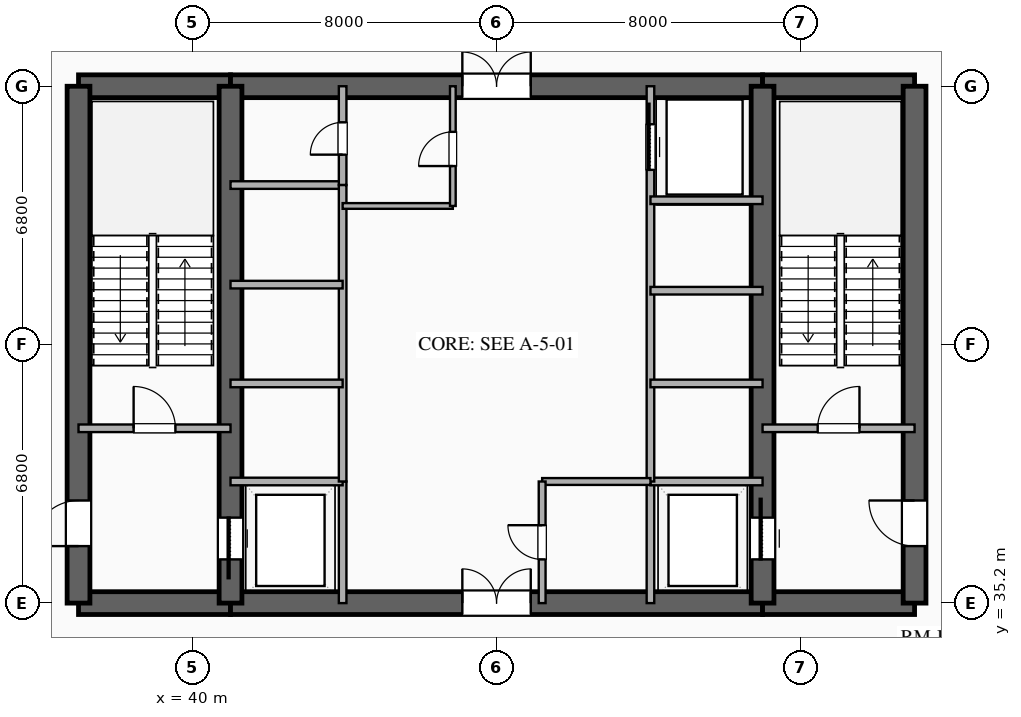
"""IFC4 building model, lengths in metres.
Left out: names, types, materials, properties, quantities, classifications, styles, units other than length and angle.
Written with IfcOpenShell. Run it as: python <this file> out.ifc"""

import sys

from ifc_helpers import new_model, si_unit, direction, frame, frame_2d, origin, place, context, subcontext, project, spatial, rectangle, extrude, element, fill, save


model = new_model("IFC4")
c1 = context("Model", 3, precision=1e-05, world=origin(), true_north=direction((0.0, 1.0)))
c2 = subcontext(c1, "Body", "Model", "MODEL_VIEW")
j1 = project(units=[si_unit("LENGTHUNIT", "METRE"), si_unit("PLANEANGLEUNIT", "RADIAN")], contexts=[c1])
p1 = place(None, origin())
s1 = spatial("IfcSite", under=j1, at=p1, CompositionType="ELEMENT")
p2 = place(p1, origin())
s2 = spatial("IfcBuilding", under=s1, at=p2, CompositionType="ELEMENT")
p3 = place(p2, frame((0.0, 0.0, -9.0)))
s3 = spatial("IfcBuildingStorey", under=s2, at=p3, CompositionType="ELEMENT", Elevation=-9.0)
p4 = place(p3, frame((37.0, 35.2, 0.0), z_axis=(0.0, 0.0, 1.0), x_axis=(1.0, 0.0, 0.0)))
e1 = element("IfcWall", 1, at=p4, inside=s3, PredefinedType="SHEAR", context=c2, shape_type="SweptSolid", body=[
    extrude(rectangle(XDim=4.0, YDim=0.6, at=frame_2d((2.0, 0.0))), origin(), (0.0, 0.0, 1.0), 4.18),
])
p5 = place(p3, frame((41.0, 35.2, 0.0), z_axis=(0.0, 0.0, 1.0), x_axis=(1.0, 0.0, 0.0)))
e2 = element("IfcWall", 2, at=p5, inside=s3, PredefinedType="SHEAR", context=c2, shape_type="SweptSolid", body=[
    extrude(rectangle(XDim=14.0, YDim=0.6, at=frame_2d((7.0, 0.0))), origin(), (0.0, 0.0, 1.0), 4.18),
])
p6 = place(p5, frame((6.1, 0.0, 0.0)))
e3 = element("IfcOpeningElement", 3, at=p6, cuts=e2, PredefinedType="OPENING", context=c2, shape_type="SweptSolid", body=[
    extrude(rectangle(XDim=1.8, YDim=2.25, at=frame_2d((0.9, 1.125))), frame((0.0, 0.31, 0.0), z_axis=(0.0, -1.0, 0.0), x_axis=(1.0, 0.0, 0.0)), (0.0, 0.0, 1.0), 0.62),
])
for number, where, z_axis, x_axis in (
    (4, (55.0, 35.2, 0.0), (0.0, 0.0, 1.0), (1.0, 0.0, 0.0)),
    (5, (37.0, 48.8, 0.0), (0.0, 0.0, 1.0), (1.0, 0.0, 0.0)),
):
    element("IfcWall", number, at=place(p3, frame(where, z_axis=z_axis, x_axis=x_axis)), inside=s3, PredefinedType="SHEAR", context=c2, shape_type="SweptSolid", body=[
        extrude(rectangle(XDim=4.0, YDim=0.6, at=frame_2d((2.0, 0.0))), origin(), (0.0, 0.0, 1.0), 4.18),
    ])
p7 = place(p3, frame((41.0, 48.8, 0.0), z_axis=(0.0, 0.0, 1.0), x_axis=(1.0, 0.0, 0.0)))
e6 = element("IfcWall", 6, at=p7, inside=s3, PredefinedType="SHEAR", context=c2, shape_type="SweptSolid", body=[
    extrude(rectangle(XDim=14.0, YDim=0.6, at=frame_2d((7.0, 0.0))), origin(), (0.0, 0.0, 1.0), 4.18),
])
p8 = place(p7, frame((6.1, 0.0, 0.0)))
e7 = element("IfcOpeningElement", 7, at=p8, cuts=e6, PredefinedType="OPENING", context=c2, shape_type="SweptSolid", body=[
    extrude(rectangle(XDim=1.8, YDim=2.25, at=frame_2d((0.9, 1.125))), frame((0.0, 0.31, 0.0), z_axis=(0.0, -1.0, 0.0), x_axis=(1.0, 0.0, 0.0)), (0.0, 0.0, 1.0), 0.62),
])
p9 = place(p3, frame((55.0, 48.8, 0.0), z_axis=(0.0, 0.0, 1.0), x_axis=(1.0, 0.0, 0.0)))
e8 = element("IfcWall", 8, at=p9, inside=s3, PredefinedType="SHEAR", context=c2, shape_type="SweptSolid", body=[
    extrude(rectangle(XDim=4.0, YDim=0.6, at=frame_2d((2.0, 0.0))), origin(), (0.0, 0.0, 1.0), 4.18),
])
p10 = place(p3, frame((37.0, 35.2, 0.0), z_axis=(0.0, 0.0, 1.0), x_axis=(0.0, 1.0, 0.0)))
e9 = element("IfcWall", 9, at=p10, inside=s3, PredefinedType="SHEAR", context=c2, shape_type="SweptSolid", body=[
    extrude(rectangle(XDim=13.6, YDim=0.6, at=frame_2d((6.8, 0.0))), origin(), (0.0, 0.0, 1.0), 4.18),
])
p11 = place(p10, frame((1.5, 0.0, 0.0)))
e10 = element("IfcOpeningElement", 10, at=p11, cuts=e9, PredefinedType="OPENING", context=c2, shape_type="SweptSolid", body=[
    extrude(rectangle(XDim=1.2, YDim=2.15, at=frame_2d((0.6, 1.075))), frame((0.0, 0.31, 0.0), z_axis=(0.0, -1.0, 0.0), x_axis=(1.0, 0.0, 0.0)), (0.0, 0.0, 1.0), 0.62),
])
p12 = place(p3, frame((59.0, 35.2, 0.0), z_axis=(0.0, 0.0, 1.0), x_axis=(0.0, 1.0, 0.0)))
e11 = element("IfcWall", 11, at=p12, inside=s3, PredefinedType="SHEAR", context=c2, shape_type="SweptSolid", body=[
    extrude(rectangle(XDim=13.6, YDim=0.6, at=frame_2d((6.8, 0.0))), origin(), (0.0, 0.0, 1.0), 4.18),
])
p13 = place(p12, frame((1.5, 0.0, 0.0)))
e12 = element("IfcOpeningElement", 12, at=p13, cuts=e11, PredefinedType="OPENING", context=c2, shape_type="SweptSolid", body=[
    extrude(rectangle(XDim=1.2, YDim=2.15, at=frame_2d((0.6, 1.075))), frame((0.0, 0.31, 0.0), z_axis=(0.0, -1.0, 0.0), x_axis=(1.0, 0.0, 0.0)), (0.0, 0.0, 1.0), 0.62),
])
p14 = place(p3, frame((41.0, 35.2, 0.0), z_axis=(0.0, 0.0, 1.0), x_axis=(0.0, 1.0, 0.0)))
e13 = element("IfcWall", 13, at=p14, inside=s3, PredefinedType="SHEAR", context=c2, shape_type="SweptSolid", body=[
    extrude(rectangle(XDim=13.6, YDim=0.6, at=frame_2d((6.8, 0.0))), origin(), (0.0, 0.0, 1.0), 4.18),
])
p15 = place(p14, frame((1.15, 0.0, 0.0)))
e14 = element("IfcOpeningElement", 14, at=p15, cuts=e13, PredefinedType="OPENING", context=c2, shape_type="SweptSolid", body=[
    extrude(rectangle(XDim=1.1, YDim=2.2, at=frame_2d((0.55, 1.1))), frame((0.0, 0.31, 0.0), z_axis=(0.0, -1.0, 0.0), x_axis=(1.0, 0.0, 0.0)), (0.0, 0.0, 1.0), 0.62),
])
p16 = place(p3, frame((55.0, 35.2, 0.0), z_axis=(0.0, 0.0, 1.0), x_axis=(0.0, 1.0, 0.0)))
e15 = element("IfcWall", 15, at=p16, inside=s3, PredefinedType="SHEAR", context=c2, shape_type="SweptSolid", body=[
    extrude(rectangle(XDim=13.6, YDim=0.6, at=frame_2d((6.8, 0.0))), origin(), (0.0, 0.0, 1.0), 4.18),
])
p17 = place(p16, frame((1.15, 0.0, 0.0)))
e16 = element("IfcOpeningElement", 16, at=p17, cuts=e15, PredefinedType="OPENING", context=c2, shape_type="SweptSolid", body=[
    extrude(rectangle(XDim=1.1, YDim=2.2, at=frame_2d((0.55, 1.1))), frame((0.0, 0.31, 0.0), z_axis=(0.0, -1.0, 0.0), x_axis=(1.0, 0.0, 0.0)), (0.0, 0.0, 1.0), 0.62),
])
p18 = place(p3, frame((37.0, 39.8, 0.0), z_axis=(0.0, 0.0, 1.0), x_axis=(1.0, 0.0, 0.0)))
e17 = element("IfcWall", 17, at=p18, inside=s3, PredefinedType="SOLIDWALL", context=c2, shape_type="SweptSolid", body=[
    extrude(rectangle(XDim=4.0, YDim=0.2, at=frame_2d((2.0, 0.0))), origin(), (0.0, 0.0, 1.0), 3.38),
])
p19 = place(p18, frame((1.45, 0.0, 0.0)))
e18 = element("IfcOpeningElement", 18, at=p19, cuts=e17, PredefinedType="OPENING", context=c2, shape_type="SweptSolid", body=[
    extrude(rectangle(XDim=1.1, YDim=2.15, at=frame_2d((0.55, 1.075))), frame((0.0, 0.11, 0.0), z_axis=(0.0, -1.0, 0.0), x_axis=(1.0, 0.0, 0.0)), (0.0, 0.0, 1.0), 0.22),
])
p20 = place(p3, frame((55.0, 39.8, 0.0), z_axis=(0.0, 0.0, 1.0), x_axis=(1.0, 0.0, 0.0)))
e19 = element("IfcWall", 19, at=p20, inside=s3, PredefinedType="SOLIDWALL", context=c2, shape_type="SweptSolid", body=[
    extrude(rectangle(XDim=4.0, YDim=0.2, at=frame_2d((2.0, 0.0))), origin(), (0.0, 0.0, 1.0), 3.38),
])
p21 = place(p20, frame((1.45, 0.0, 0.0)))
e20 = element("IfcOpeningElement", 20, at=p21, cuts=e19, PredefinedType="OPENING", context=c2, shape_type="SweptSolid", body=[
    extrude(rectangle(XDim=1.1, YDim=2.15, at=frame_2d((0.55, 1.075))), frame((0.0, 0.11, 0.0), z_axis=(0.0, -1.0, 0.0), x_axis=(1.0, 0.0, 0.0)), (0.0, 0.0, 1.0), 0.22),
])
p22 = place(p3, frame((43.95, 35.2, 0.0), z_axis=(0.0, 0.0, 1.0), x_axis=(0.0, 1.0, 0.0)))
e21 = element("IfcWall", 21, at=p22, inside=s3, PredefinedType="SOLIDWALL", context=c2, shape_type="SweptSolid", body=[
    extrude(rectangle(XDim=3.2, YDim=0.2, at=frame_2d((1.6, 0.0))), origin(), (0.0, 0.0, 1.0), 3.38),
])
p23 = place(p3, frame((41.0, 38.4, 0.0), z_axis=(0.0, 0.0, 1.0), x_axis=(1.0, 0.0, 0.0)))
e22 = element("IfcWall", 22, at=p23, inside=s3, PredefinedType="SOLIDWALL", context=c2, shape_type="SweptSolid", body=[
    extrude(rectangle(XDim=2.95, YDim=0.2, at=frame_2d((1.475, 0.0))), origin(), (0.0, 0.0, 1.0), 3.38),
])
p24 = place(p3, frame((52.05, 35.2, 0.0), z_axis=(0.0, 0.0, 1.0), x_axis=(0.0, 1.0, 0.0)))
e23 = element("IfcWall", 23, at=p24, inside=s3, PredefinedType="SOLIDWALL", context=c2, shape_type="SweptSolid", body=[
    extrude(rectangle(XDim=3.2, YDim=0.2, at=frame_2d((1.6, 0.0))), origin(), (0.0, 0.0, 1.0), 3.38),
])
for number, where, z_axis, x_axis in (
    (24, (52.05, 38.4, 0.0), (0.0, 0.0, 1.0), (1.0, 0.0, 0.0)),
    (25, (41.0, 46.2, 0.0), (0.0, 0.0, 1.0), (1.0, 0.0, 0.0)),
):
    element("IfcWall", number, at=place(p3, frame(where, z_axis=z_axis, x_axis=x_axis)), inside=s3, PredefinedType="SOLIDWALL", context=c2, shape_type="SweptSolid", body=[
        extrude(rectangle(XDim=2.95, YDim=0.2, at=frame_2d((1.475, 0.0))), origin(), (0.0, 0.0, 1.0), 3.38),
    ])
p25 = place(p3, frame((43.95, 46.2, 0.0), z_axis=(0.0, 0.0, 1.0), x_axis=(0.0, 1.0, 0.0)))
e26 = element("IfcWall", 26, at=p25, inside=s3, PredefinedType="SOLIDWALL", context=c2, shape_type="SweptSolid", body=[
    extrude(rectangle(XDim=2.6, YDim=0.2, at=frame_2d((1.3, 0.0))), origin(), (0.0, 0.0, 1.0), 3.38),
])
p26 = place(p25, frame((0.8, 0.0, 0.0)))
e27 = element("IfcOpeningElement", 27, at=p26, cuts=e26, PredefinedType="OPENING", context=c2, shape_type="SweptSolid", body=[
    extrude(rectangle(XDim=0.85, YDim=2.15, at=frame_2d((0.425, 1.075))), frame((0.0, 0.11, 0.0), z_axis=(0.0, -1.0, 0.0), x_axis=(1.0, 0.0, 0.0)), (0.0, 0.0, 1.0), 0.22),
])
p27 = place(p3, frame((43.95, 38.4, 0.0), z_axis=(0.0, 0.0, 1.0), x_axis=(0.0, 1.0, 0.0)))
e28 = element("IfcWall", 28, at=p27, inside=s3, PredefinedType="SOLIDWALL", context=c2, shape_type="SweptSolid", body=[
    extrude(rectangle(XDim=7.8, YDim=0.2, at=frame_2d((3.9, 0.0))), origin(), (0.0, 0.0, 1.0), 3.38),
])
for number, where, z_axis, x_axis in (
    (29, (41.0, 40.98, 0.0), (0.0, 0.0, 1.0), (1.0, 0.0, 0.0)),
    (30, (41.0, 43.58, 0.0), (0.0, 0.0, 1.0), (1.0, 0.0, 0.0)),
):
    element("IfcWall", number, at=place(p3, frame(where, z_axis=z_axis, x_axis=x_axis)), inside=s3, PredefinedType="SOLIDWALL", context=c2, shape_type="SweptSolid", body=[
        extrude(rectangle(XDim=2.95, YDim=0.2, at=frame_2d((1.475, 0.0))), origin(), (0.0, 0.0, 1.0), 3.38),
    ])
p28 = place(p3, frame((52.05, 38.4, 0.0), z_axis=(0.0, 0.0, 1.0), x_axis=(0.0, 1.0, 0.0)))
e31 = element("IfcWall", 31, at=p28, inside=s3, PredefinedType="SOLIDWALL", context=c2, shape_type="SweptSolid", body=[
    extrude(rectangle(XDim=10.4, YDim=0.2, at=frame_2d((5.2, 0.0))), origin(), (0.0, 0.0, 1.0), 3.38),
])
p29 = place(p28, frame((8.2, 0.0, 0.0)))
e32 = element("IfcOpeningElement", 32, at=p29, cuts=e31, PredefinedType="OPENING", context=c2, shape_type="SweptSolid", body=[
    extrude(rectangle(XDim=1.2, YDim=2.2, at=frame_2d((0.6, 1.1))), frame((0.0, 0.11, 0.0), z_axis=(0.0, -1.0, 0.0), x_axis=(1.0, 0.0, 0.0)), (0.0, 0.0, 1.0), 0.22),
])
for number, where, z_axis, x_axis in (
    (33, (52.05, 40.98, 0.0), (0.0, 0.0, 1.0), (1.0, 0.0, 0.0)),
    (34, (52.05, 43.42, 0.0), (0.0, 0.0, 1.0), (1.0, 0.0, 0.0)),
    (35, (52.05, 45.8, 0.0), (0.0, 0.0, 1.0), (1.0, 0.0, 0.0)),
):
    element("IfcWall", number, at=place(p3, frame(where, z_axis=z_axis, x_axis=x_axis)), inside=s3, PredefinedType="SOLIDWALL", context=c2, shape_type="SweptSolid", body=[
        extrude(rectangle(XDim=2.95, YDim=0.2, at=frame_2d((1.475, 0.0))), origin(), (0.0, 0.0, 1.0), 3.38),
    ])
p30 = place(p3, frame((43.95, 45.65, 0.0), z_axis=(0.0, 0.0, 1.0), x_axis=(1.0, 0.0, 0.0)))
e36 = element("IfcWall", 36, at=p30, inside=s3, PredefinedType="PARTITIONING", context=c2, shape_type="SweptSolid", body=[
    extrude(rectangle(XDim=2.9, YDim=0.15, at=frame_2d((1.45, 0.0))), origin(), (0.0, 0.0, 1.0), 3.38),
])
p31 = place(p3, frame((46.85, 45.65, 0.0), z_axis=(0.0, 0.0, 1.0), x_axis=(0.0, 1.0, 0.0)))
e37 = element("IfcWall", 37, at=p31, inside=s3, PredefinedType="PARTITIONING", context=c2, shape_type="SweptSolid", body=[
    extrude(rectangle(XDim=3.15, YDim=0.15, at=frame_2d((1.575, 0.0))), origin(), (0.0, 0.0, 1.0), 3.38),
])
p32 = place(p31, frame((1.05, 0.0, 0.0)))
e38 = element("IfcOpeningElement", 38, at=p32, cuts=e37, PredefinedType="OPENING", context=c2, shape_type="SweptSolid", body=[
    extrude(rectangle(XDim=0.9, YDim=2.15, at=frame_2d((0.45, 1.075))), frame((0.0, 0.085, 0.0), z_axis=(0.0, -1.0, 0.0), x_axis=(1.0, 0.0, 0.0)), (0.0, 0.0, 1.0), 0.17),
])
p33 = place(p3, frame((49.2, 38.4, 0.0), z_axis=(0.0, 0.0, 1.0), x_axis=(1.0, 0.0, 0.0)))
e39 = element("IfcWall", 39, at=p33, inside=s3, PredefinedType="PLUMBINGWALL", context=c2, shape_type="SweptSolid", body=[
    extrude(rectangle(XDim=2.85, YDim=0.18, at=frame_2d((1.425, 0.0))), origin(), (0.0, 0.0, 1.0), 3.38),
])
p34 = place(p3, frame((49.2, 35.2, 0.0), z_axis=(0.0, 0.0, 1.0), x_axis=(0.0, 1.0, 0.0)))
e40 = element("IfcWall", 40, at=p34, inside=s3, PredefinedType="PLUMBINGWALL", context=c2, shape_type="SweptSolid", body=[
    extrude(rectangle(XDim=3.2, YDim=0.18, at=frame_2d((1.6, 0.0))), origin(), (0.0, 0.0, 1.0), 3.38),
])
p35 = place(p34, frame((1.15, 0.0, 0.0)))
e41 = element("IfcOpeningElement", 41, at=p35, cuts=e40, PredefinedType="OPENING", context=c2, shape_type="SweptSolid", body=[
    extrude(rectangle(XDim=0.9, YDim=2.1, at=frame_2d((0.45, 1.05))), frame((0.0, 0.1, 0.0), z_axis=(0.0, -1.0, 0.0), x_axis=(1.0, 0.0, 0.0)), (0.0, 0.0, 1.0), 0.2),
])
p36 = place(p15, origin())
e42 = element("IfcDoor", 42, at=p36, inside=s3, OperationType="SLIDING_TO_LEFT", PredefinedType="DOOR", context=c2, shape_type="SweptSolid", body=[
    extrude(rectangle(XDim=1.1, YDim=2.2, at=frame_2d((0.55, 1.1))), frame((0.0, 0.025, 0.0), z_axis=(0.0, -1.0, 0.0), x_axis=(1.0, 0.0, 0.0)), (0.0, 0.0, 1.0), 0.05),
])
fill(e14, e42)
p37 = place(p17, origin())
e43 = element("IfcDoor", 43, at=p37, inside=s3, OperationType="SLIDING_TO_RIGHT", PredefinedType="DOOR", context=c2, shape_type="SweptSolid", body=[
    extrude(rectangle(XDim=1.1, YDim=2.2, at=frame_2d((0.55, 1.1))), frame((0.0, 0.025, 0.0), z_axis=(0.0, -1.0, 0.0), x_axis=(1.0, 0.0, 0.0)), (0.0, 0.0, 1.0), 0.05),
])
fill(e16, e43)
p38 = place(p11, origin())
e44 = element("IfcDoor", 44, at=p38, inside=s3, OperationType="SINGLE_SWING_LEFT", PredefinedType="DOOR", context=c2, shape_type="SweptSolid", body=[
    extrude(rectangle(XDim=1.2, YDim=2.15, at=frame_2d((0.6, 1.075))), frame((0.0, 0.025, 0.0), z_axis=(0.0, -1.0, 0.0), x_axis=(1.0, 0.0, 0.0)), (0.0, 0.0, 1.0), 0.05),
])
fill(e10, e44)
p39 = place(p13, origin())
e45 = element("IfcDoor", 45, at=p39, inside=s3, OperationType="SINGLE_SWING_RIGHT", PredefinedType="DOOR", context=c2, shape_type="SweptSolid", body=[
    extrude(rectangle(XDim=1.2, YDim=2.15, at=frame_2d((0.6, 1.075))), frame((0.0, 0.025, 0.0), z_axis=(0.0, -1.0, 0.0), x_axis=(1.0, 0.0, 0.0)), (0.0, 0.0, 1.0), 0.05),
])
fill(e12, e45)
p40 = place(p6, origin())
e46 = element("IfcDoor", 46, at=p40, inside=s3, OperationType="DOUBLE_DOOR_SINGLE_SWING", PredefinedType="DOOR", context=c2, shape_type="SweptSolid", body=[
    extrude(rectangle(XDim=1.8, YDim=2.25, at=frame_2d((0.9, 1.125))), frame((0.0, 0.025, 0.0), z_axis=(0.0, -1.0, 0.0), x_axis=(1.0, 0.0, 0.0)), (0.0, 0.0, 1.0), 0.05),
])
fill(e3, e46)
p41 = place(p8, origin())
e47 = element("IfcDoor", 47, at=p41, inside=s3, OperationType="DOUBLE_DOOR_SINGLE_SWING", PredefinedType="DOOR", context=c2, shape_type="SweptSolid", body=[
    extrude(rectangle(XDim=1.8, YDim=2.25, at=frame_2d((0.9, 1.125))), frame((0.0, 0.025, 0.0), z_axis=(0.0, -1.0, 0.0), x_axis=(1.0, 0.0, 0.0)), (0.0, 0.0, 1.0), 0.05),
])
fill(e7, e47)
p42 = place(p19, origin())
e48 = element("IfcDoor", 48, at=p42, inside=s3, OperationType="SINGLE_SWING_LEFT", PredefinedType="DOOR", context=c2, shape_type="SweptSolid", body=[
    extrude(rectangle(XDim=1.1, YDim=2.15, at=frame_2d((0.55, 1.075))), frame((0.0, 0.025, 0.0), z_axis=(0.0, -1.0, 0.0), x_axis=(1.0, 0.0, 0.0)), (0.0, 0.0, 1.0), 0.05),
])
fill(e18, e48)
p43 = place(p21, origin())
e49 = element("IfcDoor", 49, at=p43, inside=s3, OperationType="SINGLE_SWING_RIGHT", PredefinedType="DOOR", context=c2, shape_type="SweptSolid", body=[
    extrude(rectangle(XDim=1.1, YDim=2.15, at=frame_2d((0.55, 1.075))), frame((0.0, 0.025, 0.0), z_axis=(0.0, -1.0, 0.0), x_axis=(1.0, 0.0, 0.0)), (0.0, 0.0, 1.0), 0.05),
])
fill(e20, e49)
p44 = place(p26, origin())
e50 = element("IfcDoor", 50, at=p44, inside=s3, OperationType="SINGLE_SWING_LEFT", PredefinedType="DOOR", context=c2, shape_type="SweptSolid", body=[
    extrude(rectangle(XDim=0.85, YDim=2.15, at=frame_2d((0.425, 1.075))), frame((0.0, 0.025, 0.0), z_axis=(0.0, -1.0, 0.0), x_axis=(1.0, 0.0, 0.0)), (0.0, 0.0, 1.0), 0.05),
])
fill(e27, e50)
p45 = place(p29, origin())
e51 = element("IfcDoor", 51, at=p45, inside=s3, OperationType="SLIDING_TO_RIGHT", PredefinedType="DOOR", context=c2, shape_type="SweptSolid", body=[
    extrude(rectangle(XDim=1.2, YDim=2.2, at=frame_2d((0.6, 1.1))), frame((0.0, 0.025, 0.0), z_axis=(0.0, -1.0, 0.0), x_axis=(1.0, 0.0, 0.0)), (0.0, 0.0, 1.0), 0.05),
])
fill(e32, e51)
p46 = place(p32, origin())
e52 = element("IfcDoor", 52, at=p46, inside=s3, OperationType="SINGLE_SWING_LEFT", PredefinedType="DOOR", context=c2, shape_type="SweptSolid", body=[
    extrude(rectangle(XDim=0.9, YDim=2.15, at=frame_2d((0.45, 1.075))), frame((0.0, 0.025, 0.0), z_axis=(0.0, -1.0, 0.0), x_axis=(1.0, 0.0, 0.0)), (0.0, 0.0, 1.0), 0.05),
])
fill(e38, e52)
p47 = place(p35, origin())
e53 = element("IfcDoor", 53, at=p47, inside=s3, OperationType="SINGLE_SWING_RIGHT", PredefinedType="DOOR", context=c2, shape_type="SweptSolid", body=[
    extrude(rectangle(XDim=0.9, YDim=2.1, at=frame_2d((0.45, 1.05))), frame((0.0, 0.025, 0.0), z_axis=(0.0, -1.0, 0.0), x_axis=(1.0, 0.0, 0.0)), (0.0, 0.0, 1.0), 0.05),
])
fill(e41, e53)
save(model, sys.argv[1])
